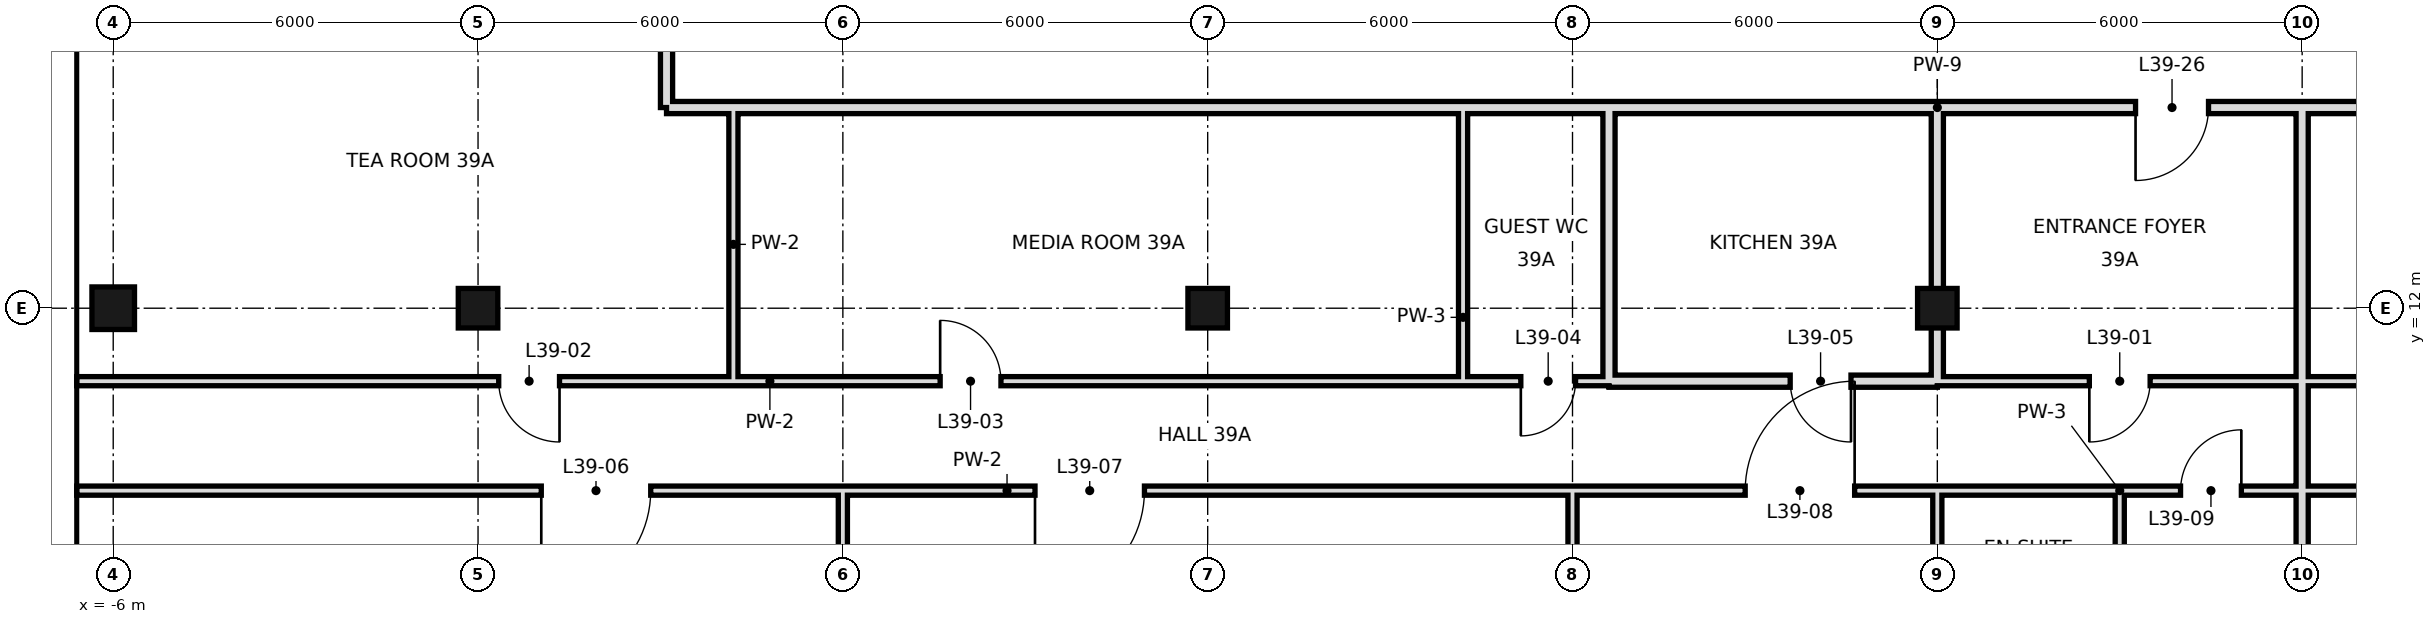
"""IFC4 building model, lengths in metres.
Left out: names, types, materials, properties, quantities, classifications, styles, units other than length and angle.
Written with IfcOpenShell. Run it as: python <this file> out.ifc"""

import sys

from ifc_helpers import new_model, si_unit, direction, frame, frame_2d, origin, origin_2d, place, context, subcontext, project, spatial, rectangle, hollow_rectangle, extrude, element, fill, save


model = new_model("IFC4")
c1 = context("Model", 3, precision=1e-05, world=origin(), true_north=direction((0.0, 1.0)))
c2 = subcontext(c1, "Body", "Model", "MODEL_VIEW")
j1 = project(units=[si_unit("LENGTHUNIT", "METRE"), si_unit("PLANEANGLEUNIT", "RADIAN")], contexts=[c1])
p1 = place(None, origin())
s1 = spatial("IfcSite", under=j1, at=p1, CompositionType="ELEMENT")
p2 = place(p1, origin())
s2 = spatial("IfcBuilding", under=s1, at=p2, CompositionType="ELEMENT")
p3 = place(p2, frame((0.0, 0.0, 170.8)))
s3 = spatial("IfcBuildingStorey", under=s2, at=p3, CompositionType="ELEMENT", Elevation=170.8)
p4 = place(p3, frame((-6.0, 12.0, 0.0), z_axis=(0.0, 0.0, 1.0), x_axis=(1.0, 0.0, 0.0)))
e1 = element("IfcColumn", 1, at=p4, inside=s3, PredefinedType="COLUMN", context=c2, shape_type="SweptSolid", body=[
    extrude(hollow_rectangle(XDim=0.7, YDim=0.7, WallThickness=0.036, at=origin_2d()), origin(), (0.0, 0.0, 1.0), 3.6),
])
for number, where, z_axis, x_axis in (
    (2, (0.0, 12.0, 0.0), (0.0, 0.0, 1.0), (1.0, 0.0, 0.0)),
    (3, (12.0, 12.0, 0.0), (0.0, 0.0, 1.0), (1.0, 0.0, 0.0)),
    (4, (24.0, 12.0, 0.0), (0.0, 0.0, 1.0), (1.0, 0.0, 0.0)),
):
    element("IfcColumn", number, at=place(p3, frame(where, z_axis=z_axis, x_axis=x_axis)), inside=s3, PredefinedType="COLUMN", context=c2, shape_type="SweptSolid", body=[
        extrude(hollow_rectangle(XDim=0.65, YDim=0.65, WallThickness=0.032, at=origin_2d()), origin(), (0.0, 0.0, 1.0), 3.6),
    ])
p5 = place(p3, frame((16.2, 10.8, 0.0), z_axis=(0.0, 0.0, 1.0), x_axis=(0.0, 1.0, 0.0)))
e5 = element("IfcWall", 5, at=p5, inside=s3, PredefinedType="PARTITIONING", context=c2, shape_type="SweptSolid", body=[
    extrude(rectangle(XDim=4.5, YDim=0.15, at=frame_2d((2.25, 0.0))), origin(), (0.0, 0.0, 1.0), 3.42),
])
p6 = place(p3, frame((18.0, -0.6, 0.0), z_axis=(0.0, 0.0, 1.0), x_axis=(0.0, 1.0, 0.0)))
e6 = element("IfcWall", 6, at=p6, inside=s3, PredefinedType="PARTITIONING", context=c2, shape_type="SweptSolid", body=[
    extrude(rectangle(XDim=9.6, YDim=0.15, at=frame_2d((4.8, 0.0))), origin(), (0.0, 0.0, 1.0), 2.72),
])
for number, where, z_axis, x_axis in (
    (7, (18.6, 10.8, 0.0), (0.0, 0.0, 1.0), (0.0, 1.0, 0.0)),
    (8, (24.0, 10.8, 0.0), (0.0, 0.0, 1.0), (0.0, 1.0, 0.0)),
):
    element("IfcWall", number, at=place(p3, frame(where, z_axis=z_axis, x_axis=x_axis)), inside=s3, PredefinedType="SOLIDWALL", context=c2, shape_type="SweptSolid", body=[
        extrude(rectangle(XDim=4.5, YDim=0.2, at=frame_2d((2.25, 0.0))), origin(), (0.0, 0.0, 1.0), 2.72),
    ])
p7 = place(p3, frame((24.0, 6.0, 0.0), z_axis=(0.0, 0.0, 1.0), x_axis=(0.0, 1.0, 0.0)))
e9 = element("IfcWall", 9, at=p7, inside=s3, PredefinedType="PARTITIONING", context=c2, shape_type="SweptSolid", body=[
    extrude(rectangle(XDim=3.0, YDim=0.15, at=frame_2d((1.5, 0.0))), origin(), (0.0, 0.0, 1.0), 2.72),
])
p8 = place(p3, frame((27.0, 6.0, 0.0), z_axis=(0.0, 0.0, 1.0), x_axis=(0.0, 1.0, 0.0)))
e10 = element("IfcWall", 10, at=p8, inside=s3, PredefinedType="PARTITIONING", context=c2, shape_type="SweptSolid", body=[
    extrude(rectangle(XDim=3.0, YDim=0.15, at=frame_2d((1.5, 0.0))), origin(), (0.0, 0.0, 1.0), 3.42),
])
p9 = place(p3, frame((3.1, 15.3, 0.0), z_axis=(0.0, 0.0, 1.0), x_axis=(0.0, 1.0, 0.0)))
e11 = element("IfcWall", 11, at=p9, inside=s3, PredefinedType="SOLIDWALL", context=c2, shape_type="SweptSolid", body=[
    extrude(rectangle(XDim=33.3, YDim=0.2, at=frame_2d((16.65, 0.0))), origin(), (0.0, 0.0, 1.0), 2.72),
])
p10 = place(p9, frame((17.1, 0.0, 0.0)))
e12 = element("IfcOpeningElement", 12, at=p10, cuts=e11, PredefinedType="OPENING", context=c2, shape_type="SweptSolid", body=[
    extrude(rectangle(XDim=1.2, YDim=2.4, at=frame_2d((0.6, 1.2))), frame((0.0, 0.11, 0.0), z_axis=(0.0, -1.0, 0.0), x_axis=(1.0, 0.0, 0.0)), (0.0, 0.0, 1.0), 0.22),
])
p11 = place(p3, frame((30.0, -0.6, 0.0), z_axis=(0.0, 0.0, 1.0), x_axis=(0.0, 1.0, 0.0)))
e13 = element("IfcWall", 13, at=p11, inside=s3, PredefinedType="SOLIDWALL", context=c2, shape_type="SweptSolid", body=[
    extrude(rectangle(XDim=15.9, YDim=0.2, at=frame_2d((7.95, 0.0))), origin(), (0.0, 0.0, 1.0), 2.72),
])
p12 = place(p3, frame((4.2, 10.8, 0.0), z_axis=(0.0, 0.0, 1.0), x_axis=(0.0, 1.0, 0.0)))
e14 = element("IfcWall", 14, at=p12, inside=s3, PredefinedType="PARTITIONING", context=c2, shape_type="SweptSolid", body=[
    extrude(rectangle(XDim=4.5, YDim=0.15, at=frame_2d((2.25, 0.0))), origin(), (0.0, 0.0, 1.0), 3.42),
])
p13 = place(p3, frame((6.0, -0.6, 0.0), z_axis=(0.0, 0.0, 1.0), x_axis=(0.0, 1.0, 0.0)))
e15 = element("IfcWall", 15, at=p13, inside=s3, PredefinedType="PARTITIONING", context=c2, shape_type="SweptSolid", body=[
    extrude(rectangle(XDim=9.6, YDim=0.15, at=frame_2d((4.8, 0.0))), origin(), (0.0, 0.0, 1.0), 2.72),
])
p14 = place(p3, frame((18.6, 10.8, 0.0), z_axis=(0.0, 0.0, 1.0), x_axis=(1.0, 0.0, 0.0)))
e16 = element("IfcWall", 16, at=p14, inside=s3, PredefinedType="SOLIDWALL", context=c2, shape_type="SweptSolid", body=[
    extrude(rectangle(XDim=5.4, YDim=0.2, at=frame_2d((2.7, 0.0))), origin(), (0.0, 0.0, 1.0), 2.72),
])
p15 = place(p14, frame((2.98, 0.0, 0.0)))
e17 = element("IfcOpeningElement", 17, at=p15, cuts=e16, PredefinedType="OPENING", context=c2, shape_type="SweptSolid", body=[
    extrude(rectangle(XDim=1.0, YDim=2.4, at=frame_2d((0.5, 1.2))), frame((0.0, 0.11, 0.0), z_axis=(0.0, -1.0, 0.0), x_axis=(1.0, 0.0, 0.0)), (0.0, 0.0, 1.0), 0.22),
])
p16 = place(p3, frame((-6.6, 10.8, 0.0), z_axis=(0.0, 0.0, 1.0), x_axis=(1.0, 0.0, 0.0)))
e18 = element("IfcWall", 18, at=p16, inside=s3, PredefinedType="PARTITIONING", context=c2, shape_type="SweptSolid", body=[
    extrude(rectangle(XDim=22.8, YDim=0.15, at=frame_2d((11.4, 0.0))), origin(), (0.0, 0.0, 1.0), 3.42),
])
p17 = place(p16, frame((6.94, 0.0, 0.0)))
e19 = element("IfcOpeningElement", 19, at=p17, cuts=e18, PredefinedType="OPENING", context=c2, shape_type="SweptSolid", body=[
    extrude(rectangle(XDim=1.0, YDim=2.4, at=frame_2d((0.5, 1.2))), frame((0.0, 0.085, 0.0), z_axis=(0.0, -1.0, 0.0), x_axis=(1.0, 0.0, 0.0)), (0.0, 0.0, 1.0), 0.17),
])
p18 = place(p16, frame((14.2, 0.0, 0.0)))
e20 = element("IfcOpeningElement", 20, at=p18, cuts=e18, PredefinedType="OPENING", context=c2, shape_type="SweptSolid", body=[
    extrude(rectangle(XDim=1.0, YDim=2.4, at=frame_2d((0.5, 1.2))), frame((0.0, 0.085, 0.0), z_axis=(0.0, -1.0, 0.0), x_axis=(1.0, 0.0, 0.0)), (0.0, 0.0, 1.0), 0.17),
])
p19 = place(p3, frame((24.0, 10.8, 0.0), z_axis=(0.0, 0.0, 1.0), x_axis=(1.0, 0.0, 0.0)))
e21 = element("IfcWall", 21, at=p19, inside=s3, PredefinedType="PARTITIONING", context=c2, shape_type="SweptSolid", body=[
    extrude(rectangle(XDim=19.8, YDim=0.15, at=frame_2d((9.9, 0.0))), origin(), (0.0, 0.0, 1.0), 3.42),
])
p20 = place(p19, frame((2.5, 0.0, 0.0)))
e22 = element("IfcOpeningElement", 22, at=p20, cuts=e21, PredefinedType="OPENING", context=c2, shape_type="SweptSolid", body=[
    extrude(rectangle(XDim=1.0, YDim=2.4, at=frame_2d((0.5, 1.2))), frame((0.0, 0.085, 0.0), z_axis=(0.0, -1.0, 0.0), x_axis=(1.0, 0.0, 0.0)), (0.0, 0.0, 1.0), 0.17),
])
p21 = place(p19, frame((8.56, 0.0, 0.0)))
e23 = element("IfcOpeningElement", 23, at=p21, cuts=e21, PredefinedType="OPENING", context=c2, shape_type="SweptSolid", body=[
    extrude(rectangle(XDim=1.0, YDim=2.4, at=frame_2d((0.5, 1.2))), frame((0.0, 0.085, 0.0), z_axis=(0.0, -1.0, 0.0), x_axis=(1.0, 0.0, 0.0)), (0.0, 0.0, 1.0), 0.17),
])
p22 = place(p19, frame((16.3, 0.0, 0.0)))
e24 = element("IfcOpeningElement", 24, at=p22, cuts=e21, PredefinedType="OPENING", context=c2, shape_type="SweptSolid", body=[
    extrude(rectangle(XDim=1.0, YDim=2.4, at=frame_2d((0.5, 1.2))), frame((0.0, 0.085, 0.0), z_axis=(0.0, -1.0, 0.0), x_axis=(1.0, 0.0, 0.0)), (0.0, 0.0, 1.0), 0.17),
])
p23 = place(p3, frame((16.2, 10.8, 0.0), z_axis=(0.0, 0.0, 1.0), x_axis=(1.0, 0.0, 0.0)))
e25 = element("IfcWall", 25, at=p23, inside=s3, PredefinedType="PARTITIONING", context=c2, shape_type="SweptSolid", body=[
    extrude(rectangle(XDim=2.4, YDim=0.15, at=frame_2d((1.2, 0.0))), origin(), (0.0, 0.0, 1.0), 3.42),
])
p24 = place(p23, frame((0.95, 0.0, 0.0)))
e26 = element("IfcOpeningElement", 26, at=p24, cuts=e25, PredefinedType="OPENING", context=c2, shape_type="SweptSolid", body=[
    extrude(rectangle(XDim=0.9, YDim=2.4, at=frame_2d((0.45, 1.2))), frame((0.0, 0.085, 0.0), z_axis=(0.0, -1.0, 0.0), x_axis=(1.0, 0.0, 0.0)), (0.0, 0.0, 1.0), 0.17),
])
p25 = place(p3, frame((3.1, 15.3, 0.0), z_axis=(0.0, 0.0, 1.0), x_axis=(1.0, 0.0, 0.0)))
e27 = element("IfcWall", 27, at=p25, inside=s3, PredefinedType="SOLIDWALL", context=c2, shape_type="SweptSolid", body=[
    extrude(rectangle(XDim=15.5, YDim=0.2, at=frame_2d((7.75, 0.0))), origin(), (0.0, 0.0, 1.0), 2.72),
])
p26 = place(p3, frame((24.0, 15.3, 0.0), z_axis=(0.0, 0.0, 1.0), x_axis=(1.0, 0.0, 0.0)))
e28 = element("IfcWall", 28, at=p26, inside=s3, PredefinedType="SOLIDWALL", context=c2, shape_type="SweptSolid", body=[
    extrude(rectangle(XDim=20.9, YDim=0.2, at=frame_2d((10.45, 0.0))), origin(), (0.0, 0.0, 1.0), 2.72),
])
p27 = place(p26, frame((3.26, 0.0, 0.0)))
e29 = element("IfcOpeningElement", 29, at=p27, cuts=e28, PredefinedType="OPENING", context=c2, shape_type="SweptSolid", body=[
    extrude(rectangle(XDim=1.2, YDim=2.4, at=frame_2d((0.6, 1.2))), frame((0.0, 0.11, 0.0), z_axis=(0.0, -1.0, 0.0), x_axis=(1.0, 0.0, 0.0)), (0.0, 0.0, 1.0), 0.22),
])
p28 = place(p26, frame((7.18, 0.0, 0.0)))
e30 = element("IfcOpeningElement", 30, at=p28, cuts=e28, PredefinedType="OPENING", context=c2, shape_type="SweptSolid", body=[
    extrude(rectangle(XDim=1.2, YDim=2.4, at=frame_2d((0.6, 1.2))), frame((0.0, 0.11, 0.0), z_axis=(0.0, -1.0, 0.0), x_axis=(1.0, 0.0, 0.0)), (0.0, 0.0, 1.0), 0.22),
])
p29 = place(p3, frame((18.6, 15.3, 0.0), z_axis=(0.0, 0.0, 1.0), x_axis=(1.0, 0.0, 0.0)))
e31 = element("IfcWall", 31, at=p29, inside=s3, PredefinedType="SOLIDWALL", context=c2, shape_type="SweptSolid", body=[
    extrude(rectangle(XDim=5.4, YDim=0.2, at=frame_2d((2.7, 0.0))), origin(), (0.0, 0.0, 1.0), 3.42),
])
p30 = place(p3, frame((-6.6, 9.0, 0.0), z_axis=(0.0, 0.0, 1.0), x_axis=(1.0, 0.0, 0.0)))
e32 = element("IfcWall", 32, at=p30, inside=s3, PredefinedType="PARTITIONING", context=c2, shape_type="SweptSolid", body=[
    extrude(rectangle(XDim=30.6, YDim=0.15, at=frame_2d((15.3, 0.0))), origin(), (0.0, 0.0, 1.0), 3.42),
])
p31 = place(p30, frame((7.64, 0.0, 0.0)))
e33 = element("IfcOpeningElement", 33, at=p31, cuts=e32, PredefinedType="OPENING", context=c2, shape_type="SweptSolid", body=[
    extrude(rectangle(XDim=1.8, YDim=2.4, at=frame_2d((0.9, 1.2))), frame((0.0, 0.085, 0.0), z_axis=(0.0, -1.0, 0.0), x_axis=(1.0, 0.0, 0.0)), (0.0, 0.0, 1.0), 0.17),
])
p32 = place(p30, frame((15.76, 0.0, 0.0)))
e34 = element("IfcOpeningElement", 34, at=p32, cuts=e32, PredefinedType="OPENING", context=c2, shape_type="SweptSolid", body=[
    extrude(rectangle(XDim=1.8, YDim=2.4, at=frame_2d((0.9, 1.2))), frame((0.0, 0.085, 0.0), z_axis=(0.0, -1.0, 0.0), x_axis=(1.0, 0.0, 0.0)), (0.0, 0.0, 1.0), 0.17),
])
p33 = place(p30, frame((27.44, 0.0, 0.0)))
e35 = element("IfcOpeningElement", 35, at=p33, cuts=e32, PredefinedType="OPENING", context=c2, shape_type="SweptSolid", body=[
    extrude(rectangle(XDim=1.8, YDim=2.4, at=frame_2d((0.9, 1.2))), frame((0.0, 0.085, 0.0), z_axis=(0.0, -1.0, 0.0), x_axis=(1.0, 0.0, 0.0)), (0.0, 0.0, 1.0), 0.17),
])
p34 = place(p3, frame((27.0, 9.0, 0.0), z_axis=(0.0, 0.0, 1.0), x_axis=(1.0, 0.0, 0.0)))
e36 = element("IfcWall", 36, at=p34, inside=s3, PredefinedType="PARTITIONING", context=c2, shape_type="SweptSolid", body=[
    extrude(rectangle(XDim=15.0, YDim=0.15, at=frame_2d((7.5, 0.0))), origin(), (0.0, 0.0, 1.0), 3.42),
])
p35 = place(p34, frame((1.0, 0.0, 0.0)))
e37 = element("IfcOpeningElement", 37, at=p35, cuts=e36, PredefinedType="OPENING", context=c2, shape_type="SweptSolid", body=[
    extrude(rectangle(XDim=1.0, YDim=2.4, at=frame_2d((0.5, 1.2))), frame((0.0, 0.085, 0.0), z_axis=(0.0, -1.0, 0.0), x_axis=(1.0, 0.0, 0.0)), (0.0, 0.0, 1.0), 0.17),
])
p36 = place(p34, frame((6.16, 0.0, 0.0)))
e38 = element("IfcOpeningElement", 38, at=p36, cuts=e36, PredefinedType="OPENING", context=c2, shape_type="SweptSolid", body=[
    extrude(rectangle(XDim=1.8, YDim=2.4, at=frame_2d((0.9, 1.2))), frame((0.0, 0.085, 0.0), z_axis=(0.0, -1.0, 0.0), x_axis=(1.0, 0.0, 0.0)), (0.0, 0.0, 1.0), 0.17),
])
p37 = place(p3, frame((24.0, 9.0, 0.0), z_axis=(0.0, 0.0, 1.0), x_axis=(1.0, 0.0, 0.0)))
e39 = element("IfcWall", 39, at=p37, inside=s3, PredefinedType="PARTITIONING", context=c2, shape_type="SweptSolid", body=[
    extrude(rectangle(XDim=3.0, YDim=0.15, at=frame_2d((1.5, 0.0))), origin(), (0.0, 0.0, 1.0), 3.42),
])
p38 = place(p20, frame((1.0, 0.0, 0.0), z_axis=(0.0, 0.0, 1.0), x_axis=(-1.0, 0.0, 0.0)))
e40 = element("IfcDoor", 40, at=p38, inside=s3, OperationType="SINGLE_SWING_RIGHT", PredefinedType="DOOR", context=c2, shape_type="SweptSolid", body=[
    extrude(rectangle(XDim=1.0, YDim=2.4, at=frame_2d((0.5, 1.2))), frame((0.0, 0.025, 0.0), z_axis=(0.0, -1.0, 0.0), x_axis=(1.0, 0.0, 0.0)), (0.0, 0.0, 1.0), 0.05),
])
fill(e22, e40)
p39 = place(p17, origin())
e41 = element("IfcDoor", 41, at=p39, inside=s3, OperationType="SINGLE_SWING_RIGHT", PredefinedType="DOOR", context=c2, shape_type="SweptSolid", body=[
    extrude(rectangle(XDim=1.0, YDim=2.4, at=frame_2d((0.5, 1.2))), frame((0.0, 0.025, 0.0), z_axis=(0.0, -1.0, 0.0), x_axis=(1.0, 0.0, 0.0)), (0.0, 0.0, 1.0), 0.05),
])
fill(e19, e41)
p40 = place(p18, origin())
e42 = element("IfcDoor", 42, at=p40, inside=s3, OperationType="SINGLE_SWING_LEFT", PredefinedType="DOOR", context=c2, shape_type="SweptSolid", body=[
    extrude(rectangle(XDim=1.0, YDim=2.4, at=frame_2d((0.5, 1.2))), frame((0.0, 0.025, 0.0), z_axis=(0.0, -1.0, 0.0), x_axis=(1.0, 0.0, 0.0)), (0.0, 0.0, 1.0), 0.05),
])
fill(e20, e42)
p41 = place(p24, frame((0.9, 0.0, 0.0), z_axis=(0.0, 0.0, 1.0), x_axis=(-1.0, 0.0, 0.0)))
e43 = element("IfcDoor", 43, at=p41, inside=s3, OperationType="SINGLE_SWING_RIGHT", PredefinedType="DOOR", context=c2, shape_type="SweptSolid", body=[
    extrude(rectangle(XDim=0.9, YDim=2.4, at=frame_2d((0.45, 1.2))), frame((0.0, 0.025, 0.0), z_axis=(0.0, -1.0, 0.0), x_axis=(1.0, 0.0, 0.0)), (0.0, 0.0, 1.0), 0.05),
])
fill(e26, e43)
p42 = place(p15, origin())
e44 = element("IfcDoor", 44, at=p42, inside=s3, OperationType="SINGLE_SWING_RIGHT", PredefinedType="DOOR", context=c2, shape_type="SweptSolid", body=[
    extrude(rectangle(XDim=1.0, YDim=2.4, at=frame_2d((0.5, 1.2))), frame((0.0, 0.025, 0.0), z_axis=(0.0, -1.0, 0.0), x_axis=(1.0, 0.0, 0.0)), (0.0, 0.0, 1.0), 0.05),
])
fill(e17, e44)
p43 = place(p31, frame((1.8, 0.0, 0.0), z_axis=(0.0, 0.0, 1.0), x_axis=(-1.0, 0.0, 0.0)))
e45 = element("IfcDoor", 45, at=p43, inside=s3, OperationType="SINGLE_SWING_RIGHT", PredefinedType="DOOR", context=c2, shape_type="SweptSolid", body=[
    extrude(rectangle(XDim=1.8, YDim=2.4, at=frame_2d((0.9, 1.2))), frame((0.0, 0.025, 0.0), z_axis=(0.0, -1.0, 0.0), x_axis=(1.0, 0.0, 0.0)), (0.0, 0.0, 1.0), 0.05),
])
fill(e33, e45)
p44 = place(p32, frame((1.8, 0.0, 0.0), z_axis=(0.0, 0.0, 1.0), x_axis=(-1.0, 0.0, 0.0)))
e46 = element("IfcDoor", 46, at=p44, inside=s3, OperationType="SINGLE_SWING_RIGHT", PredefinedType="DOOR", context=c2, shape_type="SweptSolid", body=[
    extrude(rectangle(XDim=1.8, YDim=2.4, at=frame_2d((0.9, 1.2))), frame((0.0, 0.025, 0.0), z_axis=(0.0, -1.0, 0.0), x_axis=(1.0, 0.0, 0.0)), (0.0, 0.0, 1.0), 0.05),
])
fill(e34, e46)
p45 = place(p33, frame((1.8, 0.0, 0.0), z_axis=(0.0, 0.0, 1.0), x_axis=(-1.0, 0.0, 0.0)))
e47 = element("IfcDoor", 47, at=p45, inside=s3, OperationType="SINGLE_SWING_LEFT", PredefinedType="DOOR", context=c2, shape_type="SweptSolid", body=[
    extrude(rectangle(XDim=1.8, YDim=2.4, at=frame_2d((0.9, 1.2))), frame((0.0, 0.025, 0.0), z_axis=(0.0, -1.0, 0.0), x_axis=(1.0, 0.0, 0.0)), (0.0, 0.0, 1.0), 0.05),
])
fill(e35, e47)
p46 = place(p35, frame((1.0, 0.0, 0.0), z_axis=(0.0, 0.0, 1.0), x_axis=(-1.0, 0.0, 0.0)))
e48 = element("IfcDoor", 48, at=p46, inside=s3, OperationType="SINGLE_SWING_LEFT", PredefinedType="DOOR", context=c2, shape_type="SweptSolid", body=[
    extrude(rectangle(XDim=1.0, YDim=2.4, at=frame_2d((0.5, 1.2))), frame((0.0, 0.025, 0.0), z_axis=(0.0, -1.0, 0.0), x_axis=(1.0, 0.0, 0.0)), (0.0, 0.0, 1.0), 0.05),
])
fill(e37, e48)
p47 = place(p27, frame((1.2, 0.0, 0.0), z_axis=(0.0, 0.0, 1.0), x_axis=(-1.0, 0.0, 0.0)))
e49 = element("IfcDoor", 49, at=p47, inside=s3, OperationType="SINGLE_SWING_RIGHT", PredefinedType="DOOR", context=c2, shape_type="SweptSolid", body=[
    extrude(rectangle(XDim=1.2, YDim=2.4, at=frame_2d((0.6, 1.2))), frame((0.0, 0.025, 0.0), z_axis=(0.0, -1.0, 0.0), x_axis=(1.0, 0.0, 0.0)), (0.0, 0.0, 1.0), 0.05),
])
fill(e29, e49)
save(model, sys.argv[1])
